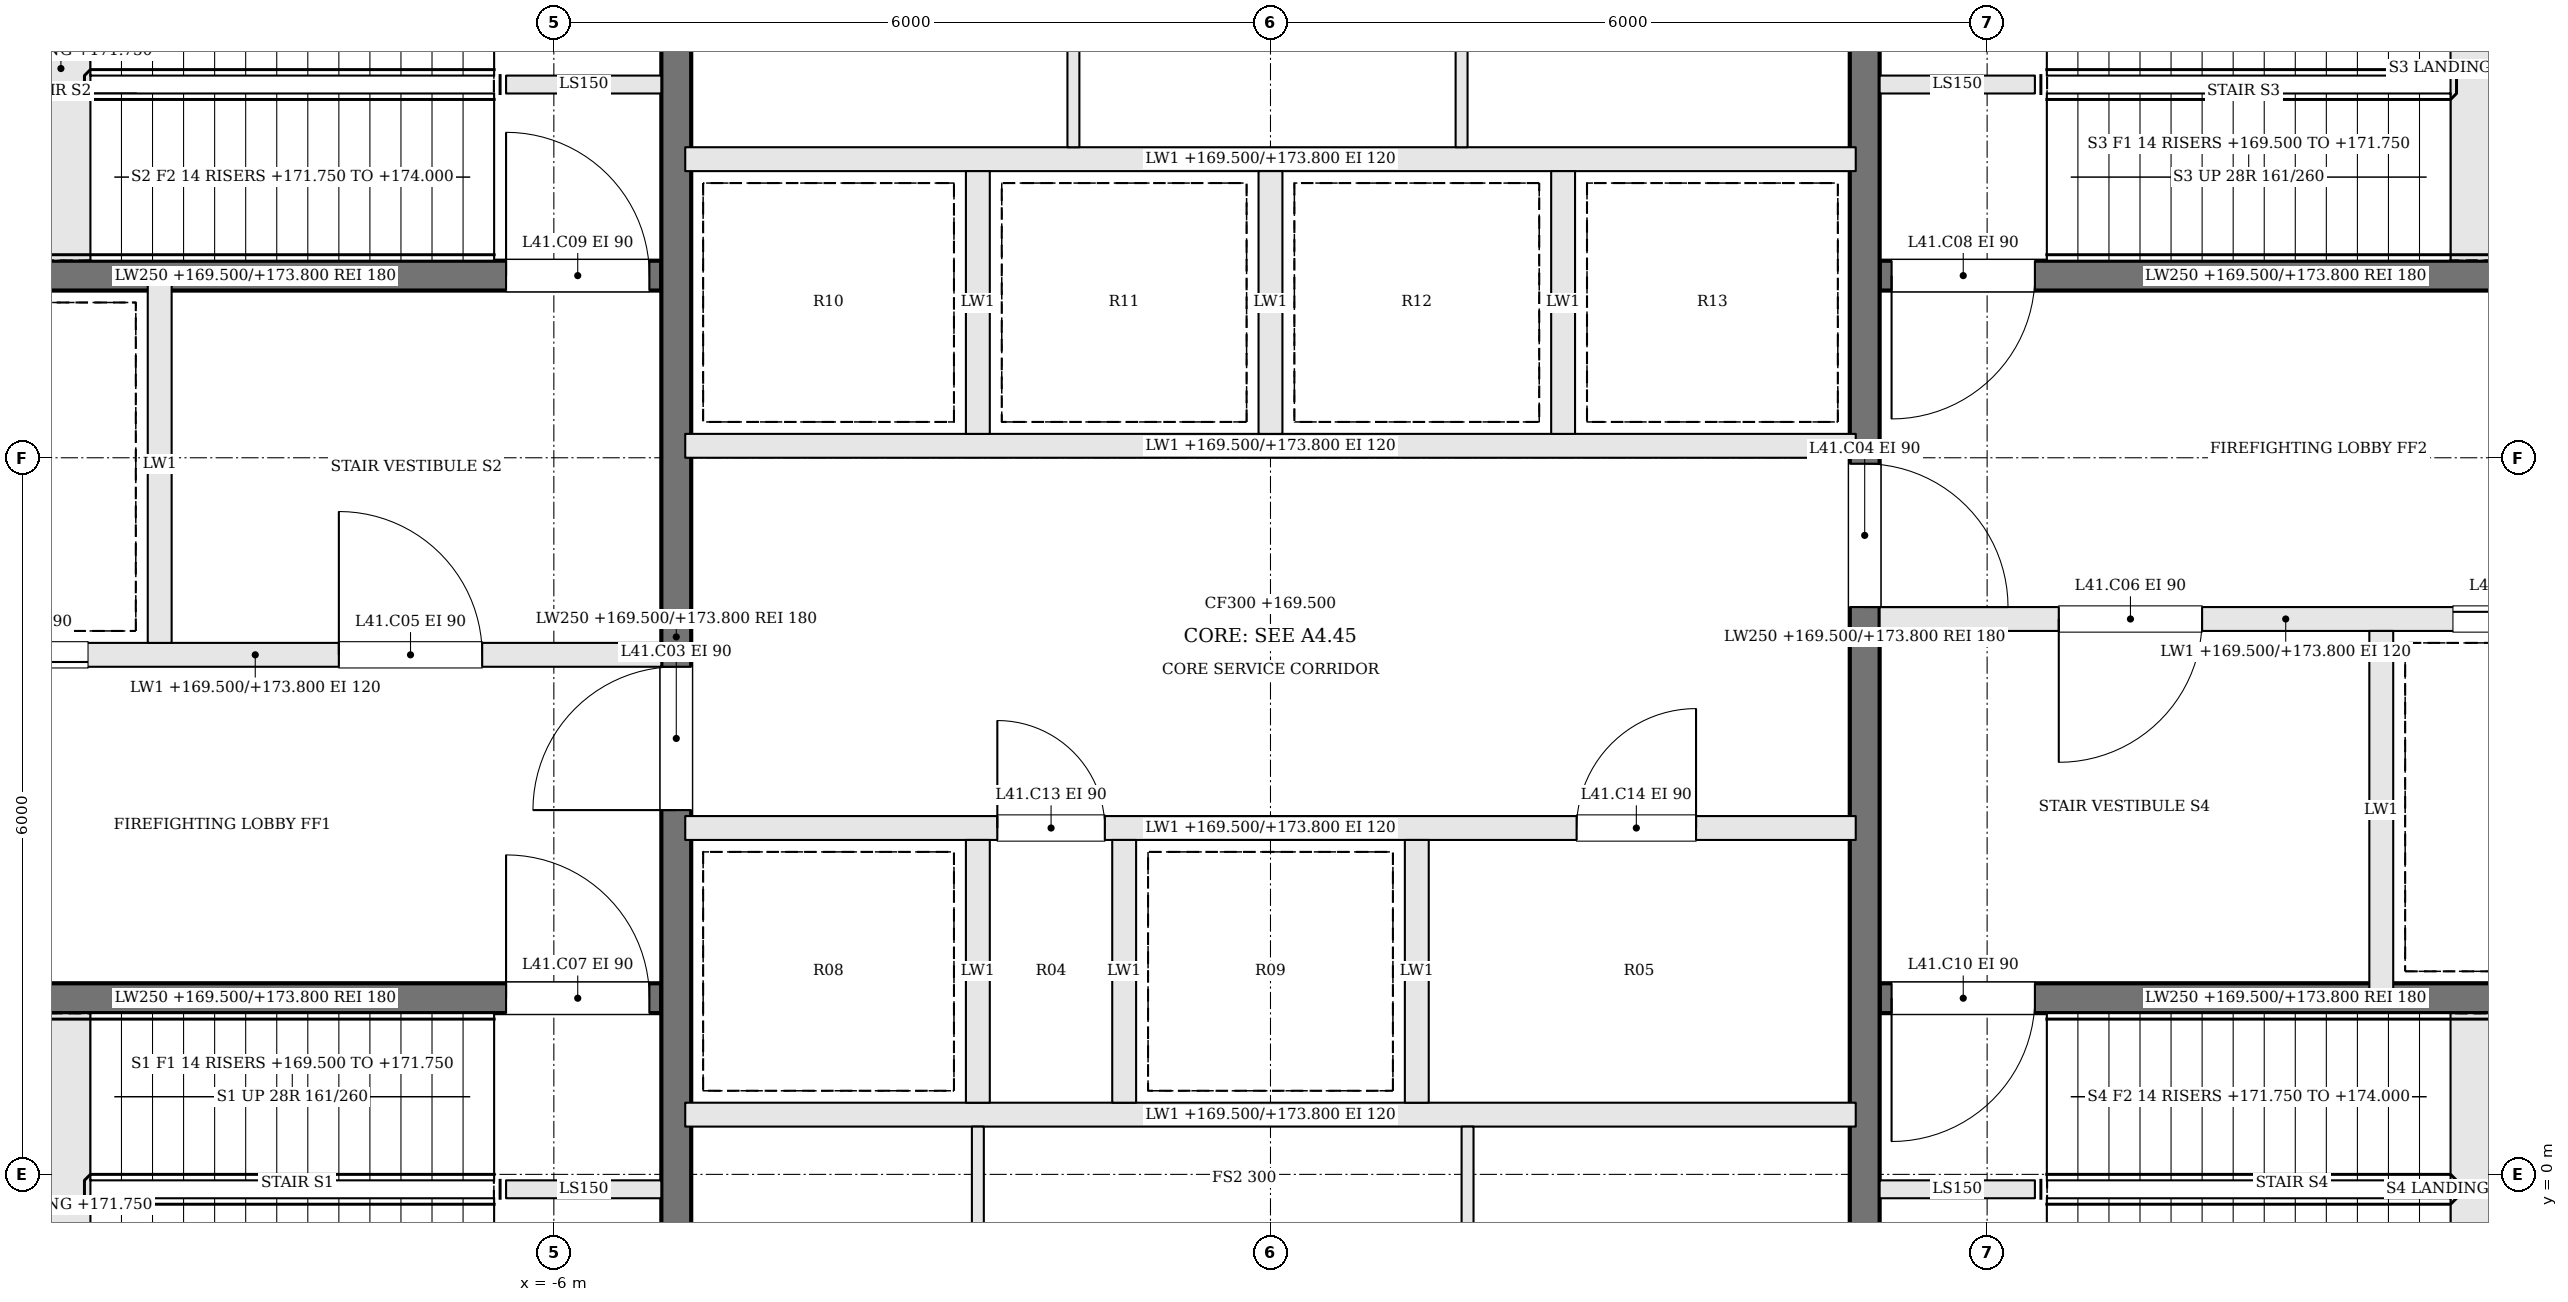
"""IFC4 building model, lengths in metres.
Left out: names, types, materials, properties, quantities, classifications, styles, units other than length and angle.
Written with IfcOpenShell. Run it as: python <this file> out.ifc"""

import sys

from ifc_helpers import new_model, si_unit, direction, frame, frame_2d, origin, place, context, subcontext, project, spatial, rectangle, extrude, element, fill, save


model = new_model("IFC4")
c1 = context("Model", 3, precision=1e-05, world=origin(), true_north=direction((0.0, 1.0)))
c2 = subcontext(c1, "Body", "Model", "MODEL_VIEW")
j1 = project(units=[si_unit("LENGTHUNIT", "METRE"), si_unit("PLANEANGLEUNIT", "RADIAN")], contexts=[c1])
p1 = place(None, origin())
s1 = spatial("IfcSite", under=j1, at=p1, CompositionType="ELEMENT")
p2 = place(p1, origin())
s2 = spatial("IfcBuilding", under=s1, at=p2, CompositionType="ELEMENT")
p3 = place(p2, frame((0.0, 0.0, 169.5)))
s3 = spatial("IfcBuildingStorey", under=s2, at=p3, CompositionType="ELEMENT", Elevation=169.5)
for number, where, z_axis, x_axis in (
    (1, (-6.4, -0.125, 0.0), (0.0, 0.0, 1.0), (1.0, 0.0, 0.0)),
    (2, (6.4, 9.125, 0.0), (0.0, 0.0, 1.0), (-1.0, 0.0, 0.0)),
    (3, (-6.4, 9.125, 0.0), (0.0, 0.0, 1.0), (1.0, 0.0, 0.0)),
    (4, (6.4, -0.125, 0.0), (0.0, 0.0, 1.0), (-1.0, 0.0, 0.0)),
):
    element("IfcWall", number, at=place(p3, frame(where, z_axis=z_axis, x_axis=x_axis)), inside=s3, PredefinedType="SOLIDWALL", context=c2, shape_type="SweptSolid", body=[
        extrude(rectangle(XDim=1.3, YDim=0.15, at=frame_2d((0.65, 0.0))), origin(), (0.0, 0.0, 1.0), 4.3),
    ])
p4 = place(p3, frame((-11.9, 1.475, 0.0), z_axis=(0.0, 0.0, 1.0), x_axis=(1.0, 0.0, 0.0)))
e5 = element("IfcWall", 5, at=p4, inside=s3, PredefinedType="SOLIDWALL", context=c2, shape_type="SweptSolid", body=[
    extrude(rectangle(XDim=6.8, YDim=0.25, at=frame_2d((3.4, 0.0))), origin(), (0.0, 0.0, 1.0), 4.3),
])
p5 = place(p4, frame((5.5, 0.0, 0.0)))
e6 = element("IfcOpeningElement", 6, at=p5, cuts=e5, PredefinedType="OPENING", context=c2, shape_type="SweptSolid", body=[
    extrude(rectangle(XDim=1.2, YDim=2.1, at=frame_2d((0.6, 1.05))), frame((0.0, 0.135, 0.0), z_axis=(0.0, -1.0, 0.0), x_axis=(1.0, 0.0, 0.0)), (0.0, 0.0, 1.0), 0.27),
])
p6 = place(p3, frame((11.9, 7.525, 0.0), z_axis=(0.0, 0.0, 1.0), x_axis=(-1.0, 0.0, 0.0)))
e7 = element("IfcWall", 7, at=p6, inside=s3, PredefinedType="SOLIDWALL", context=c2, shape_type="SweptSolid", body=[
    extrude(rectangle(XDim=6.8, YDim=0.25, at=frame_2d((3.4, 0.0))), origin(), (0.0, 0.0, 1.0), 4.3),
])
p7 = place(p6, frame((5.5, 0.0, 0.0)))
e8 = element("IfcOpeningElement", 8, at=p7, cuts=e7, PredefinedType="OPENING", context=c2, shape_type="SweptSolid", body=[
    extrude(rectangle(XDim=1.2, YDim=2.1, at=frame_2d((0.6, 1.05))), frame((0.0, 0.135, 0.0), z_axis=(0.0, -1.0, 0.0), x_axis=(1.0, 0.0, 0.0)), (0.0, 0.0, 1.0), 0.27),
])
p8 = place(p3, frame((-11.9, 4.35, 0.0), z_axis=(0.0, 0.0, 1.0), x_axis=(1.0, 0.0, 0.0)))
e9 = element("IfcWall", 9, at=p8, inside=s3, PredefinedType="SOLIDWALL", context=c2, shape_type="SweptSolid", body=[
    extrude(rectangle(XDim=6.8, YDim=0.2, at=frame_2d((3.4, 0.0))), origin(), (0.0, 0.0, 1.0), 4.3),
])
p9 = place(p8, frame((4.1, 0.0, 0.0)))
e10 = element("IfcOpeningElement", 10, at=p9, cuts=e9, PredefinedType="OPENING", context=c2, shape_type="SweptSolid", body=[
    extrude(rectangle(XDim=1.2, YDim=2.1, at=frame_2d((0.6, 1.05))), frame((0.0, 0.11, 0.0), z_axis=(0.0, -1.0, 0.0), x_axis=(1.0, 0.0, 0.0)), (0.0, 0.0, 1.0), 0.22),
])
p10 = place(p8, frame((0.8, 0.0, 0.0)))
e11 = element("IfcOpeningElement", 11, at=p10, cuts=e9, PredefinedType="OPENING", context=c2, shape_type="SweptSolid", body=[
    extrude(rectangle(XDim=1.2, YDim=2.1, at=frame_2d((0.6, 1.05))), frame((0.0, 0.11, 0.0), z_axis=(0.0, -1.0, 0.0), x_axis=(1.0, 0.0, 0.0)), (0.0, 0.0, 1.0), 0.22),
])
p11 = place(p3, frame((11.9, 4.65, 0.0), z_axis=(0.0, 0.0, 1.0), x_axis=(-1.0, 0.0, 0.0)))
e12 = element("IfcWall", 12, at=p11, inside=s3, PredefinedType="SOLIDWALL", context=c2, shape_type="SweptSolid", body=[
    extrude(rectangle(XDim=6.8, YDim=0.2, at=frame_2d((3.4, 0.0))), origin(), (0.0, 0.0, 1.0), 4.3),
])
p12 = place(p11, frame((4.1, 0.0, 0.0)))
e13 = element("IfcOpeningElement", 13, at=p12, cuts=e12, PredefinedType="OPENING", context=c2, shape_type="SweptSolid", body=[
    extrude(rectangle(XDim=1.2, YDim=2.1, at=frame_2d((0.6, 1.05))), frame((0.0, 0.11, 0.0), z_axis=(0.0, -1.0, 0.0), x_axis=(1.0, 0.0, 0.0)), (0.0, 0.0, 1.0), 0.22),
])
p13 = place(p11, frame((0.8, 0.0, 0.0)))
e14 = element("IfcOpeningElement", 14, at=p13, cuts=e12, PredefinedType="OPENING", context=c2, shape_type="SweptSolid", body=[
    extrude(rectangle(XDim=1.2, YDim=2.1, at=frame_2d((0.6, 1.05))), frame((0.0, 0.11, 0.0), z_axis=(0.0, -1.0, 0.0), x_axis=(1.0, 0.0, 0.0)), (0.0, 0.0, 1.0), 0.22),
])
p14 = place(p3, frame((-11.9, 7.525, 0.0), z_axis=(0.0, 0.0, 1.0), x_axis=(1.0, 0.0, 0.0)))
e15 = element("IfcWall", 15, at=p14, inside=s3, PredefinedType="SOLIDWALL", context=c2, shape_type="SweptSolid", body=[
    extrude(rectangle(XDim=6.8, YDim=0.25, at=frame_2d((3.4, 0.0))), origin(), (0.0, 0.0, 1.0), 4.3),
])
p15 = place(p14, frame((5.5, 0.0, 0.0)))
e16 = element("IfcOpeningElement", 16, at=p15, cuts=e15, PredefinedType="OPENING", context=c2, shape_type="SweptSolid", body=[
    extrude(rectangle(XDim=1.2, YDim=2.1, at=frame_2d((0.6, 1.05))), frame((0.0, 0.135, 0.0), z_axis=(0.0, -1.0, 0.0), x_axis=(1.0, 0.0, 0.0)), (0.0, 0.0, 1.0), 0.27),
])
p16 = place(p3, frame((11.9, 1.475, 0.0), z_axis=(0.0, 0.0, 1.0), x_axis=(-1.0, 0.0, 0.0)))
e17 = element("IfcWall", 17, at=p16, inside=s3, PredefinedType="SOLIDWALL", context=c2, shape_type="SweptSolid", body=[
    extrude(rectangle(XDim=6.8, YDim=0.25, at=frame_2d((3.4, 0.0))), origin(), (0.0, 0.0, 1.0), 4.3),
])
p17 = place(p16, frame((5.5, 0.0, 0.0)))
e18 = element("IfcOpeningElement", 18, at=p17, cuts=e17, PredefinedType="OPENING", context=c2, shape_type="SweptSolid", body=[
    extrude(rectangle(XDim=1.2, YDim=2.1, at=frame_2d((0.6, 1.05))), frame((0.0, 0.135, 0.0), z_axis=(0.0, -1.0, 0.0), x_axis=(1.0, 0.0, 0.0)), (0.0, 0.0, 1.0), 0.27),
])
for number, where, z_axis, x_axis in (
    (19, (-9.3, 4.45, 0.0), (0.0, 0.0, 1.0), (0.0, 1.0, 0.0)),
    (20, (9.3, 4.55, 0.0), (0.0, 0.0, 1.0), (0.0, -1.0, 0.0)),
):
    element("IfcWall", number, at=place(p3, frame(where, z_axis=z_axis, x_axis=x_axis)), inside=s3, PredefinedType="SOLIDWALL", context=c2, shape_type="SweptSolid", body=[
        extrude(rectangle(XDim=3.0, YDim=0.2, at=frame_2d((1.5, 0.0))), origin(), (0.0, 0.0, 1.0), 4.3),
    ])
p18 = place(p3, frame((-4.975, -1.9, 0.0), z_axis=(0.0, 0.0, 1.0), x_axis=(0.0, 1.0, 0.0)))
e21 = element("IfcWall", 21, at=p18, inside=s3, PredefinedType="SOLIDWALL", context=c2, shape_type="SweptSolid", body=[
    extrude(rectangle(XDim=12.8, YDim=0.25, at=frame_2d((6.4, 0.0))), origin(), (0.0, 0.0, 1.0), 4.3),
])
p19 = place(p18, frame((4.95, 0.0, 0.0)))
e22 = element("IfcOpeningElement", 22, at=p19, cuts=e21, PredefinedType="OPENING", context=c2, shape_type="SweptSolid", body=[
    extrude(rectangle(XDim=1.2, YDim=2.1, at=frame_2d((0.6, 1.05))), frame((0.0, 0.135, 0.0), z_axis=(0.0, -1.0, 0.0), x_axis=(1.0, 0.0, 0.0)), (0.0, 0.0, 1.0), 0.27),
])
p20 = place(p3, frame((4.975, 10.9, 0.0), z_axis=(0.0, 0.0, 1.0), x_axis=(0.0, -1.0, 0.0)))
e23 = element("IfcWall", 23, at=p20, inside=s3, PredefinedType="SOLIDWALL", context=c2, shape_type="SweptSolid", body=[
    extrude(rectangle(XDim=12.8, YDim=0.25, at=frame_2d((6.4, 0.0))), origin(), (0.0, 0.0, 1.0), 4.3),
])
p21 = place(p20, frame((4.95, 0.0, 0.0)))
e24 = element("IfcOpeningElement", 24, at=p21, cuts=e23, PredefinedType="OPENING", context=c2, shape_type="SweptSolid", body=[
    extrude(rectangle(XDim=1.2, YDim=2.1, at=frame_2d((0.6, 1.05))), frame((0.0, 0.135, 0.0), z_axis=(0.0, -1.0, 0.0), x_axis=(1.0, 0.0, 0.0)), (0.0, 0.0, 1.0), 0.27),
])
p22 = place(p3, frame((-4.9, 0.5, 0.0), z_axis=(0.0, 0.0, 1.0), x_axis=(1.0, 0.0, 0.0)))
e25 = element("IfcWall", 25, at=p22, inside=s3, PredefinedType="SOLIDWALL", context=c2, shape_type="SweptSolid", body=[
    extrude(rectangle(XDim=9.8, YDim=0.2, at=frame_2d((4.9, 0.0))), origin(), (0.0, 0.0, 1.0), 4.3),
])
p23 = place(p3, frame((-4.9, 2.9, 0.0), z_axis=(0.0, 0.0, 1.0), x_axis=(1.0, 0.0, 0.0)))
e26 = element("IfcWall", 26, at=p23, inside=s3, PredefinedType="SOLIDWALL", context=c2, shape_type="SweptSolid", body=[
    extrude(rectangle(XDim=9.8, YDim=0.2, at=frame_2d((4.9, 0.0))), origin(), (0.0, 0.0, 1.0), 4.3),
])
p24 = place(p23, frame((2.613, 0.0, 0.0)))
e27 = element("IfcOpeningElement", 27, at=p24, cuts=e26, PredefinedType="OPENING", context=c2, shape_type="SweptSolid", body=[
    extrude(rectangle(XDim=0.9, YDim=2.1, at=frame_2d((0.45, 1.05))), frame((0.0, 0.11, 0.0), z_axis=(0.0, -1.0, 0.0), x_axis=(1.0, 0.0, 0.0)), (0.0, 0.0, 1.0), 0.22),
])
p25 = place(p23, frame((7.463, 0.0, 0.0)))
e28 = element("IfcOpeningElement", 28, at=p25, cuts=e26, PredefinedType="OPENING", context=c2, shape_type="SweptSolid", body=[
    extrude(rectangle(XDim=1.0, YDim=2.1, at=frame_2d((0.5, 1.05))), frame((0.0, 0.11, 0.0), z_axis=(0.0, -1.0, 0.0), x_axis=(1.0, 0.0, 0.0)), (0.0, 0.0, 1.0), 0.22),
])
for number, where, z_axis, x_axis in (
    (29, (-4.9, 6.1, 0.0), (0.0, 0.0, 1.0), (1.0, 0.0, 0.0)),
    (30, (-4.9, 8.5, 0.0), (0.0, 0.0, 1.0), (1.0, 0.0, 0.0)),
):
    element("IfcWall", number, at=place(p3, frame(where, z_axis=z_axis, x_axis=x_axis)), inside=s3, PredefinedType="SOLIDWALL", context=c2, shape_type="SweptSolid", body=[
        extrude(rectangle(XDim=9.8, YDim=0.2, at=frame_2d((4.9, 0.0))), origin(), (0.0, 0.0, 1.0), 4.3),
    ])
for number, where, z_axis, x_axis in (
    (31, (-2.45, 0.6, 0.0), (0.0, 0.0, 1.0), (0.0, 1.0, 0.0)),
    (32, (-1.225, 0.6, 0.0), (0.0, 0.0, 1.0), (0.0, 1.0, 0.0)),
    (33, (1.225, 0.6, 0.0), (0.0, 0.0, 1.0), (0.0, 1.0, 0.0)),
    (34, (-2.45, 6.2, 0.0), (0.0, 0.0, 1.0), (0.0, 1.0, 0.0)),
    (35, (0.0, 6.2, 0.0), (0.0, 0.0, 1.0), (0.0, 1.0, 0.0)),
    (36, (2.45, 6.2, 0.0), (0.0, 0.0, 1.0), (0.0, 1.0, 0.0)),
):
    element("IfcWall", number, at=place(p3, frame(where, z_axis=z_axis, x_axis=x_axis)), inside=s3, PredefinedType="SOLIDWALL", context=c2, shape_type="SweptSolid", body=[
        extrude(rectangle(XDim=2.2, YDim=0.2, at=frame_2d((1.1, 0.0))), origin(), (0.0, 0.0, 1.0), 4.3),
    ])
for number, where, z_axis, x_axis in (
    (37, (-2.45, -1.9, 0.0), (0.0, 0.0, 1.0), (0.0, 1.0, 0.0)),
    (38, (1.65, -1.9, 0.0), (0.0, 0.0, 1.0), (0.0, 1.0, 0.0)),
    (39, (-1.65, 8.6, 0.0), (0.0, 0.0, 1.0), (0.0, 1.0, 0.0)),
    (40, (1.6, 8.6, 0.0), (0.0, 0.0, 1.0), (0.0, 1.0, 0.0)),
):
    element("IfcWall", number, at=place(p3, frame(where, z_axis=z_axis, x_axis=x_axis)), inside=s3, PredefinedType="PARTITIONING", context=c2, shape_type="SweptSolid", body=[
        extrude(rectangle(XDim=2.3, YDim=0.1, at=frame_2d((1.15, 0.0))), origin(), (0.0, 0.0, 1.0), 4.3),
    ])
p26 = place(p19, origin())
e41 = element("IfcDoor", 41, at=p26, inside=s3, OperationType="SINGLE_SWING_LEFT", PredefinedType="DOOR", context=c2, shape_type="SweptSolid", body=[
    extrude(rectangle(XDim=1.2, YDim=2.1, at=frame_2d((0.6, 1.05))), frame((0.0, 0.025, 0.0), z_axis=(0.0, -1.0, 0.0), x_axis=(1.0, 0.0, 0.0)), (0.0, 0.0, 1.0), 0.05),
])
fill(e22, e41)
p27 = place(p21, origin())
e42 = element("IfcDoor", 42, at=p27, inside=s3, OperationType="SINGLE_SWING_RIGHT", PredefinedType="DOOR", context=c2, shape_type="SweptSolid", body=[
    extrude(rectangle(XDim=1.2, YDim=2.1, at=frame_2d((0.6, 1.05))), frame((0.0, 0.025, 0.0), z_axis=(0.0, -1.0, 0.0), x_axis=(1.0, 0.0, 0.0)), (0.0, 0.0, 1.0), 0.05),
])
fill(e24, e42)
p28 = place(p9, origin())
e43 = element("IfcDoor", 43, at=p28, inside=s3, OperationType="SINGLE_SWING_LEFT", PredefinedType="DOOR", context=c2, shape_type="SweptSolid", body=[
    extrude(rectangle(XDim=1.2, YDim=2.1, at=frame_2d((0.6, 1.05))), frame((0.0, 0.025, 0.0), z_axis=(0.0, -1.0, 0.0), x_axis=(1.0, 0.0, 0.0)), (0.0, 0.0, 1.0), 0.05),
])
fill(e10, e43)
p29 = place(p12, origin())
e44 = element("IfcDoor", 44, at=p29, inside=s3, OperationType="SINGLE_SWING_RIGHT", PredefinedType="DOOR", context=c2, shape_type="SweptSolid", body=[
    extrude(rectangle(XDim=1.2, YDim=2.1, at=frame_2d((0.6, 1.05))), frame((0.0, 0.025, 0.0), z_axis=(0.0, -1.0, 0.0), x_axis=(1.0, 0.0, 0.0)), (0.0, 0.0, 1.0), 0.05),
])
fill(e13, e44)
p30 = place(p5, origin())
e45 = element("IfcDoor", 45, at=p30, inside=s3, OperationType="SINGLE_SWING_LEFT", PredefinedType="DOOR", context=c2, shape_type="SweptSolid", body=[
    extrude(rectangle(XDim=1.2, YDim=2.1, at=frame_2d((0.6, 1.05))), frame((0.0, 0.025, 0.0), z_axis=(0.0, -1.0, 0.0), x_axis=(1.0, 0.0, 0.0)), (0.0, 0.0, 1.0), 0.05),
])
fill(e6, e45)
p31 = place(p7, origin())
e46 = element("IfcDoor", 46, at=p31, inside=s3, OperationType="SINGLE_SWING_RIGHT", PredefinedType="DOOR", context=c2, shape_type="SweptSolid", body=[
    extrude(rectangle(XDim=1.2, YDim=2.1, at=frame_2d((0.6, 1.05))), frame((0.0, 0.025, 0.0), z_axis=(0.0, -1.0, 0.0), x_axis=(1.0, 0.0, 0.0)), (0.0, 0.0, 1.0), 0.05),
])
fill(e8, e46)
p32 = place(p15, origin())
e47 = element("IfcDoor", 47, at=p32, inside=s3, OperationType="SINGLE_SWING_LEFT", PredefinedType="DOOR", context=c2, shape_type="SweptSolid", body=[
    extrude(rectangle(XDim=1.2, YDim=2.1, at=frame_2d((0.6, 1.05))), frame((0.0, 0.025, 0.0), z_axis=(0.0, -1.0, 0.0), x_axis=(1.0, 0.0, 0.0)), (0.0, 0.0, 1.0), 0.05),
])
fill(e16, e47)
p33 = place(p17, origin())
e48 = element("IfcDoor", 48, at=p33, inside=s3, OperationType="SINGLE_SWING_RIGHT", PredefinedType="DOOR", context=c2, shape_type="SweptSolid", body=[
    extrude(rectangle(XDim=1.2, YDim=2.1, at=frame_2d((0.6, 1.05))), frame((0.0, 0.025, 0.0), z_axis=(0.0, -1.0, 0.0), x_axis=(1.0, 0.0, 0.0)), (0.0, 0.0, 1.0), 0.05),
])
fill(e18, e48)
p34 = place(p10, origin())
e49 = element("IfcDoor", 49, at=p34, inside=s3, OperationType="SLIDING_TO_RIGHT", PredefinedType="DOOR", context=c2, shape_type="SweptSolid", body=[
    extrude(rectangle(XDim=1.2, YDim=2.1, at=frame_2d((0.6, 1.05))), frame((0.0, 0.025, 0.0), z_axis=(0.0, -1.0, 0.0), x_axis=(1.0, 0.0, 0.0)), (0.0, 0.0, 1.0), 0.05),
])
fill(e11, e49)
p35 = place(p13, origin())
e50 = element("IfcDoor", 50, at=p35, inside=s3, OperationType="SLIDING_TO_RIGHT", PredefinedType="DOOR", context=c2, shape_type="SweptSolid", body=[
    extrude(rectangle(XDim=1.2, YDim=2.1, at=frame_2d((0.6, 1.05))), frame((0.0, 0.025, 0.0), z_axis=(0.0, -1.0, 0.0), x_axis=(1.0, 0.0, 0.0)), (0.0, 0.0, 1.0), 0.05),
])
fill(e14, e50)
p36 = place(p24, origin())
e51 = element("IfcDoor", 51, at=p36, inside=s3, OperationType="SINGLE_SWING_LEFT", PredefinedType="DOOR", context=c2, shape_type="SweptSolid", body=[
    extrude(rectangle(XDim=0.9, YDim=2.1, at=frame_2d((0.45, 1.05))), frame((0.0, 0.025, 0.0), z_axis=(0.0, -1.0, 0.0), x_axis=(1.0, 0.0, 0.0)), (0.0, 0.0, 1.0), 0.05),
])
fill(e27, e51)
p37 = place(p25, origin())
e52 = element("IfcDoor", 52, at=p37, inside=s3, OperationType="SINGLE_SWING_RIGHT", PredefinedType="DOOR", context=c2, shape_type="SweptSolid", body=[
    extrude(rectangle(XDim=1.0, YDim=2.1, at=frame_2d((0.5, 1.05))), frame((0.0, 0.025, 0.0), z_axis=(0.0, -1.0, 0.0), x_axis=(1.0, 0.0, 0.0)), (0.0, 0.0, 1.0), 0.05),
])
fill(e28, e52)
save(model, sys.argv[1])
